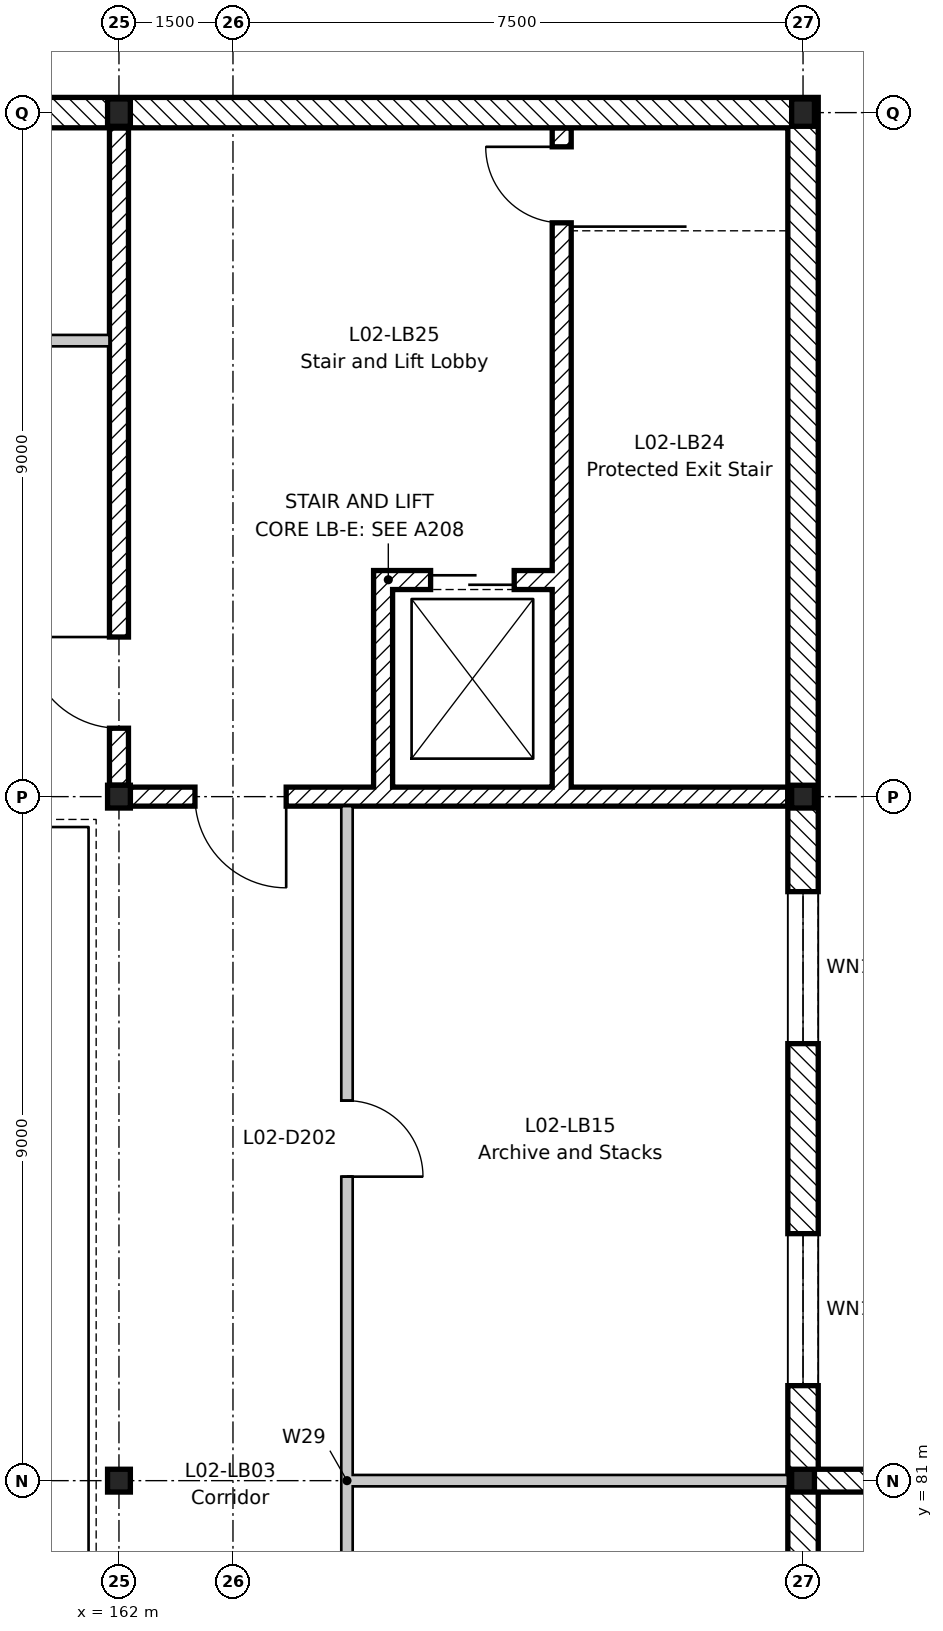
"""IFC4 building model, lengths in metres.
Left out: names, types, materials, properties, quantities, classifications, styles, units other than length and angle.
Written with IfcOpenShell. Run it as: python <this file> out.ifc"""

import sys

from ifc_helpers import new_model, si_unit, direction, frame, frame_2d, origin, origin_2d, place, context, subcontext, project, spatial, rectangle, i_section, extrude, element, fill, save


model = new_model("IFC4")
c1 = context("Model", 3, precision=1e-05, world=origin(), true_north=direction((0.0, 1.0)))
c2 = subcontext(c1, "Body", "Model", "MODEL_VIEW")
j1 = project(units=[si_unit("LENGTHUNIT", "METRE"), si_unit("PLANEANGLEUNIT", "RADIAN")], contexts=[c1])
p1 = place(None, origin())
s1 = spatial("IfcSite", under=j1, at=p1, CompositionType="ELEMENT")
p2 = place(p1, origin())
s2 = spatial("IfcBuilding", under=s1, at=p2, CompositionType="ELEMENT")
p3 = place(p2, frame((0.0, 0.0, 9.9)))
s3 = spatial("IfcBuildingStorey", under=s2, at=p3, CompositionType="ELEMENT", Elevation=9.9)
for number, where, z_axis, x_axis in (
    (1, (162.0, 81.0, -0.2), (0.0, 0.0, 1.0), (1.0, 0.0, 0.0)),
    (2, (162.0, 90.0, -0.2), (0.0, 0.0, 1.0), (1.0, 0.0, 0.0)),
):
    element("IfcColumn", number, at=place(p3, frame(where, z_axis=z_axis, x_axis=x_axis)), inside=s3, PredefinedType="COLUMN", context=c2, shape_type="SweptSolid", body=[
        extrude(i_section(OverallWidth=0.3, OverallDepth=0.3, WebThickness=0.011, FlangeThickness=0.019, FilletRadius=0.027, at=origin_2d()), origin(), (0.0, 0.0, 1.0), 4.45),
    ])
p4 = place(p3, frame((162.0, 99.0, -0.2), z_axis=(0.0, 0.0, 1.0), x_axis=(1.0, 0.0, 0.0)))
e3 = element("IfcColumn", 3, at=p4, inside=s3, PredefinedType="COLUMN", context=c2, shape_type="SweptSolid", body=[
    extrude(i_section(OverallWidth=0.3, OverallDepth=0.36, WebThickness=0.012, FlangeThickness=0.022, FilletRadius=0.027, at=origin_2d()), origin(), (0.0, 0.0, 1.0), 4.45),
])
for number, where, z_axis, x_axis in (
    (4, (171.0, 81.0, -0.2), (0.0, 0.0, 1.0), (1.0, 0.0, 0.0)),
    (5, (171.0, 90.0, -0.2), (0.0, 0.0, 1.0), (1.0, 0.0, 0.0)),
):
    element("IfcColumn", number, at=place(p3, frame(where, z_axis=z_axis, x_axis=x_axis)), inside=s3, PredefinedType="COLUMN", context=c2, shape_type="SweptSolid", body=[
        extrude(i_section(OverallWidth=0.3, OverallDepth=0.3, WebThickness=0.011, FlangeThickness=0.019, FilletRadius=0.027, at=origin_2d()), origin(), (0.0, 0.0, 1.0), 4.45),
    ])
p5 = place(p3, frame((171.0, 99.0, -0.2), z_axis=(0.0, 0.0, 1.0), x_axis=(1.0, 0.0, 0.0)))
e6 = element("IfcColumn", 6, at=p5, inside=s3, PredefinedType="COLUMN", context=c2, shape_type="SweptSolid", body=[
    extrude(i_section(OverallWidth=0.3, OverallDepth=0.36, WebThickness=0.012, FlangeThickness=0.022, FilletRadius=0.027, at=origin_2d()), origin(), (0.0, 0.0, 1.0), 4.45),
])
p6 = place(p3, frame((167.825, 98.8, 0.0), z_axis=(0.0, 0.0, 1.0), x_axis=(0.0, -1.0, 0.0)))
e7 = element("IfcWall", 7, at=p6, inside=s3, PredefinedType="SHEAR", context=c2, shape_type="SweptSolid", body=[
    extrude(rectangle(XDim=8.675, YDim=0.25, at=frame_2d((4.337, 0.0))), origin(), (0.0, 0.0, 1.0), 4.25),
])
p7 = place(p6, frame((0.25, 0.0, 0.0)))
e8 = element("IfcOpeningElement", 8, at=p7, cuts=e7, PredefinedType="OPENING", context=c2, shape_type="SweptSolid", body=[
    extrude(rectangle(XDim=1.0, YDim=2.1, at=frame_2d((0.5, 1.05))), frame((0.0, 0.135, 0.0), z_axis=(0.0, -1.0, 0.0), x_axis=(1.0, 0.0, 0.0)), (0.0, 0.0, 1.0), 0.27),
])
p8 = place(p3, frame((162.0, 98.8, 0.0), z_axis=(0.0, 0.0, 1.0), x_axis=(0.0, -1.0, 0.0)))
e9 = element("IfcWall", 9, at=p8, inside=s3, PredefinedType="SHEAR", context=c2, shape_type="SweptSolid", body=[
    extrude(rectangle(XDim=8.65, YDim=0.25, at=frame_2d((4.325, 0.0))), origin(), (0.0, 0.0, 1.0), 4.25),
])
p9 = place(p8, frame((6.7, 0.0, 0.0)))
e10 = element("IfcOpeningElement", 10, at=p9, cuts=e9, PredefinedType="OPENING", context=c2, shape_type="SweptSolid", body=[
    extrude(rectangle(XDim=1.2, YDim=2.1, at=frame_2d((0.6, 1.05))), frame((0.0, 0.135, 0.0), z_axis=(0.0, -1.0, 0.0), x_axis=(1.0, 0.0, 0.0)), (0.0, 0.0, 1.0), 0.27),
])
p10 = place(p3, frame((170.8, 90.0, 0.0), z_axis=(0.0, 0.0, 1.0), x_axis=(-1.0, 0.0, 0.0)))
e11 = element("IfcWall", 11, at=p10, inside=s3, PredefinedType="SHEAR", context=c2, shape_type="SweptSolid", body=[
    extrude(rectangle(XDim=8.65, YDim=0.25, at=frame_2d((4.325, 0.0))), origin(), (0.0, 0.0, 1.0), 4.25),
])
p11 = place(p10, frame((6.6, 0.0, 0.0)))
e12 = element("IfcOpeningElement", 12, at=p11, cuts=e11, PredefinedType="OPENING", context=c2, shape_type="SweptSolid", body=[
    extrude(rectangle(XDim=1.2, YDim=2.1, at=frame_2d((0.6, 1.05))), frame((0.0, 0.135, 0.0), z_axis=(0.0, -1.0, 0.0), x_axis=(1.0, 0.0, 0.0)), (0.0, 0.0, 1.0), 0.27),
])
p12 = place(p3, frame((167.7, 92.85, 0.0), z_axis=(0.0, 0.0, 1.0), x_axis=(-1.0, 0.0, 0.0)))
e13 = element("IfcWall", 13, at=p12, inside=s3, PredefinedType="SHEAR", context=c2, shape_type="SweptSolid", body=[
    extrude(rectangle(XDim=2.35, YDim=0.25, at=frame_2d((1.175, 0.0))), origin(), (0.0, 0.0, 1.0), 4.25),
])
p13 = place(p12, frame((0.5, 0.0, 0.0)))
e14 = element("IfcOpeningElement", 14, at=p13, cuts=e13, PredefinedType="OPENING", context=c2, shape_type="SweptSolid", body=[
    extrude(rectangle(XDim=1.1, YDim=2.1, at=frame_2d((0.55, 1.05))), frame((0.0, 0.135, 0.0), z_axis=(0.0, -1.0, 0.0), x_axis=(1.0, 0.0, 0.0)), (0.0, 0.0, 1.0), 0.27),
])
p14 = place(p3, frame((165.475, 92.725, 0.0), z_axis=(0.0, 0.0, 1.0), x_axis=(0.0, -1.0, 0.0)))
e15 = element("IfcWall", 15, at=p14, inside=s3, PredefinedType="SHEAR", context=c2, shape_type="SweptSolid", body=[
    extrude(rectangle(XDim=2.6, YDim=0.25, at=frame_2d((1.3, 0.0))), origin(), (0.0, 0.0, 1.0), 4.25),
])
p15 = place(p3, frame((171.15, 81.0, 0.0), z_axis=(0.0, 0.0, 1.0), x_axis=(1.0, 0.0, 0.0)))
e16 = element("IfcWall", 16, at=p15, inside=s3, PredefinedType="STANDARD", context=c2, shape_type="SweptSolid", body=[
    extrude(rectangle(XDim=2.85, YDim=0.3, at=frame_2d((1.425, 0.0))), origin(), (0.0, 0.0, 1.0), 3.97),
])
p16 = place(p3, frame((116.8, 99.0, 0.0), z_axis=(0.0, 0.0, 1.0), x_axis=(1.0, 0.0, 0.0)))
e17 = element("IfcWall", 17, at=p16, inside=s3, PredefinedType="STANDARD", context=c2, shape_type="SweptSolid", body=[
    extrude(rectangle(XDim=54.4, YDim=0.4, at=frame_2d((27.2, 0.0))), origin(), (0.0, 0.0, 1.0), 4.25),
])
p17 = place(p16, frame((1.45, 0.0, 0.5)))
e18 = element("IfcOpeningElement", 18, at=p17, cuts=e17, PredefinedType="OPENING", context=c2, shape_type="SweptSolid", body=[
    extrude(rectangle(XDim=2.0, YDim=3.2, at=frame_2d((1.0, 1.6))), frame((0.0, 0.21, 0.0), z_axis=(0.0, -1.0, 0.0), x_axis=(1.0, 0.0, 0.0)), (0.0, 0.0, 1.0), 0.42),
])
p18 = place(p16, frame((5.95, 0.0, 0.5)))
e19 = element("IfcOpeningElement", 19, at=p18, cuts=e17, PredefinedType="OPENING", context=c2, shape_type="SweptSolid", body=[
    extrude(rectangle(XDim=2.0, YDim=3.2, at=frame_2d((1.0, 1.6))), frame((0.0, 0.21, 0.0), z_axis=(0.0, -1.0, 0.0), x_axis=(1.0, 0.0, 0.0)), (0.0, 0.0, 1.0), 0.42),
])
p19 = place(p16, frame((10.45, 0.0, 0.5)))
e20 = element("IfcOpeningElement", 20, at=p19, cuts=e17, PredefinedType="OPENING", context=c2, shape_type="SweptSolid", body=[
    extrude(rectangle(XDim=2.0, YDim=3.2, at=frame_2d((1.0, 1.6))), frame((0.0, 0.21, 0.0), z_axis=(0.0, -1.0, 0.0), x_axis=(1.0, 0.0, 0.0)), (0.0, 0.0, 1.0), 0.42),
])
p20 = place(p16, frame((14.95, 0.0, 0.5)))
e21 = element("IfcOpeningElement", 21, at=p20, cuts=e17, PredefinedType="OPENING", context=c2, shape_type="SweptSolid", body=[
    extrude(rectangle(XDim=2.0, YDim=3.2, at=frame_2d((1.0, 1.6))), frame((0.0, 0.21, 0.0), z_axis=(0.0, -1.0, 0.0), x_axis=(1.0, 0.0, 0.0)), (0.0, 0.0, 1.0), 0.42),
])
p21 = place(p16, frame((28.45, 0.0, 0.5)))
e22 = element("IfcOpeningElement", 22, at=p21, cuts=e17, PredefinedType="OPENING", context=c2, shape_type="SweptSolid", body=[
    extrude(rectangle(XDim=2.0, YDim=3.2, at=frame_2d((1.0, 1.6))), frame((0.0, 0.21, 0.0), z_axis=(0.0, -1.0, 0.0), x_axis=(1.0, 0.0, 0.0)), (0.0, 0.0, 1.0), 0.42),
])
p22 = place(p16, frame((32.95, 0.0, 0.5)))
e23 = element("IfcOpeningElement", 23, at=p22, cuts=e17, PredefinedType="OPENING", context=c2, shape_type="SweptSolid", body=[
    extrude(rectangle(XDim=2.0, YDim=3.2, at=frame_2d((1.0, 1.6))), frame((0.0, 0.21, 0.0), z_axis=(0.0, -1.0, 0.0), x_axis=(1.0, 0.0, 0.0)), (0.0, 0.0, 1.0), 0.42),
])
p23 = place(p16, frame((37.45, 0.0, 0.5)))
e24 = element("IfcOpeningElement", 24, at=p23, cuts=e17, PredefinedType="OPENING", context=c2, shape_type="SweptSolid", body=[
    extrude(rectangle(XDim=2.0, YDim=3.2, at=frame_2d((1.0, 1.6))), frame((0.0, 0.21, 0.0), z_axis=(0.0, -1.0, 0.0), x_axis=(1.0, 0.0, 0.0)), (0.0, 0.0, 1.0), 0.42),
])
p24 = place(p16, frame((41.95, 0.0, 0.5)))
e25 = element("IfcOpeningElement", 25, at=p24, cuts=e17, PredefinedType="OPENING", context=c2, shape_type="SweptSolid", body=[
    extrude(rectangle(XDim=2.0, YDim=3.2, at=frame_2d((1.0, 1.6))), frame((0.0, 0.21, 0.0), z_axis=(0.0, -1.0, 0.0), x_axis=(1.0, 0.0, 0.0)), (0.0, 0.0, 1.0), 0.42),
])
p25 = place(p16, frame((19.55, 0.0, 0.0)))
e26 = element("IfcOpeningElement", 26, at=p25, cuts=e17, PredefinedType="OPENING", context=c2, shape_type="SweptSolid", body=[
    extrude(rectangle(XDim=1.8, YDim=2.4, at=frame_2d((0.9, 1.2))), frame((0.0, 0.21, 0.0), z_axis=(0.0, -1.0, 0.0), x_axis=(1.0, 0.0, 0.0)), (0.0, 0.0, 1.0), 0.42),
])
p26 = place(p16, frame((24.05, 0.0, 0.0)))
e27 = element("IfcOpeningElement", 27, at=p26, cuts=e17, PredefinedType="OPENING", context=c2, shape_type="SweptSolid", body=[
    extrude(rectangle(XDim=1.8, YDim=2.4, at=frame_2d((0.9, 1.2))), frame((0.0, 0.21, 0.0), z_axis=(0.0, -1.0, 0.0), x_axis=(1.0, 0.0, 0.0)), (0.0, 0.0, 1.0), 0.42),
])
p27 = place(p3, frame((171.0, 63.2, 0.0), z_axis=(0.0, 0.0, 1.0), x_axis=(0.0, 1.0, 0.0)))
e28 = element("IfcWall", 28, at=p27, inside=s3, PredefinedType="STANDARD", context=c2, shape_type="SweptSolid", body=[
    extrude(rectangle(XDim=35.6, YDim=0.4, at=frame_2d((17.8, 0.0))), origin(), (0.0, 0.0, 1.0), 4.25),
])
p28 = place(p27, frame((1.05, 0.0, 0.5)))
e29 = element("IfcOpeningElement", 29, at=p28, cuts=e28, PredefinedType="OPENING", context=c2, shape_type="SweptSolid", body=[
    extrude(rectangle(XDim=2.0, YDim=3.2, at=frame_2d((1.0, 1.6))), frame((0.0, 0.21, 0.0), z_axis=(0.0, -1.0, 0.0), x_axis=(1.0, 0.0, 0.0)), (0.0, 0.0, 1.0), 0.42),
])
p29 = place(p27, frame((5.55, 0.0, 0.5)))
e30 = element("IfcOpeningElement", 30, at=p29, cuts=e28, PredefinedType="OPENING", context=c2, shape_type="SweptSolid", body=[
    extrude(rectangle(XDim=2.0, YDim=3.2, at=frame_2d((1.0, 1.6))), frame((0.0, 0.21, 0.0), z_axis=(0.0, -1.0, 0.0), x_axis=(1.0, 0.0, 0.0)), (0.0, 0.0, 1.0), 0.42),
])
p30 = place(p27, frame((19.05, 0.0, 0.5)))
e31 = element("IfcOpeningElement", 31, at=p30, cuts=e28, PredefinedType="OPENING", context=c2, shape_type="SweptSolid", body=[
    extrude(rectangle(XDim=2.0, YDim=3.2, at=frame_2d((1.0, 1.6))), frame((0.0, 0.21, 0.0), z_axis=(0.0, -1.0, 0.0), x_axis=(1.0, 0.0, 0.0)), (0.0, 0.0, 1.0), 0.42),
])
p31 = place(p27, frame((23.55, 0.0, 0.5)))
e32 = element("IfcOpeningElement", 32, at=p31, cuts=e28, PredefinedType="OPENING", context=c2, shape_type="SweptSolid", body=[
    extrude(rectangle(XDim=2.0, YDim=3.2, at=frame_2d((1.0, 1.6))), frame((0.0, 0.21, 0.0), z_axis=(0.0, -1.0, 0.0), x_axis=(1.0, 0.0, 0.0)), (0.0, 0.0, 1.0), 0.42),
])
p32 = place(p27, frame((10.15, 0.0, 0.0)))
e33 = element("IfcOpeningElement", 33, at=p32, cuts=e28, PredefinedType="OPENING", context=c2, shape_type="SweptSolid", body=[
    extrude(rectangle(XDim=1.8, YDim=2.4, at=frame_2d((0.9, 1.2))), frame((0.0, 0.21, 0.0), z_axis=(0.0, -1.0, 0.0), x_axis=(1.0, 0.0, 0.0)), (0.0, 0.0, 1.0), 0.42),
])
p33 = place(p27, frame((14.65, 0.0, 0.0)))
e34 = element("IfcOpeningElement", 34, at=p33, cuts=e28, PredefinedType="OPENING", context=c2, shape_type="SweptSolid", body=[
    extrude(rectangle(XDim=1.8, YDim=2.4, at=frame_2d((0.9, 1.2))), frame((0.0, 0.21, 0.0), z_axis=(0.0, -1.0, 0.0), x_axis=(1.0, 0.0, 0.0)), (0.0, 0.0, 1.0), 0.42),
])
p34 = place(p3, frame((165.075, 81.0, 0.0), z_axis=(0.0, 0.0, 1.0), x_axis=(1.0, 0.0, 0.0)))
e35 = element("IfcWall", 35, at=p34, inside=s3, PredefinedType="PARTITIONING", context=c2, shape_type="SweptSolid", body=[
    extrude(rectangle(XDim=5.725, YDim=0.15, at=frame_2d((2.863, 0.0))), origin(), (0.0, 0.0, 1.0), 4.25),
])
p35 = place(p3, frame((147.0, 96.0, 0.0), z_axis=(0.0, 0.0, 1.0), x_axis=(1.0, 0.0, 0.0)))
e36 = element("IfcWall", 36, at=p35, inside=s3, PredefinedType="PARTITIONING", context=c2, shape_type="SweptSolid", body=[
    extrude(rectangle(XDim=14.875, YDim=0.15, at=frame_2d((7.438, 0.0))), origin(), (0.0, 0.0, 1.0), 4.25),
])
p36 = place(p35, frame((7.0, 0.0, 0.0)))
e37 = element("IfcOpeningElement", 37, at=p36, cuts=e36, PredefinedType="OPENING", context=c2, shape_type="SweptSolid", body=[
    extrude(rectangle(XDim=1.0, YDim=2.1, at=frame_2d((0.5, 1.05))), frame((0.0, 0.085, 0.0), z_axis=(0.0, -1.0, 0.0), x_axis=(1.0, 0.0, 0.0)), (0.0, 0.0, 1.0), 0.17),
])
p37 = place(p3, frame((165.0, 69.075, 0.0), z_axis=(0.0, 0.0, 1.0), x_axis=(0.0, 1.0, 0.0)))
e38 = element("IfcWall", 38, at=p37, inside=s3, PredefinedType="PARTITIONING", context=c2, shape_type="SweptSolid", body=[
    extrude(rectangle(XDim=20.8, YDim=0.15, at=frame_2d((10.4, 0.0))), origin(), (0.0, 0.0, 1.0), 4.25),
])
p38 = place(p37, frame((0.825, 0.0, 0.0)))
e39 = element("IfcOpeningElement", 39, at=p38, cuts=e38, PredefinedType="OPENING", context=c2, shape_type="SweptSolid", body=[
    extrude(rectangle(XDim=1.2, YDim=2.1, at=frame_2d((0.6, 1.05))), frame((0.0, 0.085, 0.0), z_axis=(0.0, -1.0, 0.0), x_axis=(1.0, 0.0, 0.0)), (0.0, 0.0, 1.0), 0.17),
])
p39 = place(p37, frame((6.925, 0.0, 0.0)))
e40 = element("IfcOpeningElement", 40, at=p39, cuts=e38, PredefinedType="OPENING", context=c2, shape_type="SweptSolid", body=[
    extrude(rectangle(XDim=1.0, YDim=2.1, at=frame_2d((0.5, 1.05))), frame((0.0, 0.085, 0.0), z_axis=(0.0, -1.0, 0.0), x_axis=(1.0, 0.0, 0.0)), (0.0, 0.0, 1.0), 0.17),
])
p40 = place(p37, frame((15.925, 0.0, 0.0)))
e41 = element("IfcOpeningElement", 41, at=p40, cuts=e38, PredefinedType="OPENING", context=c2, shape_type="SweptSolid", body=[
    extrude(rectangle(XDim=1.0, YDim=2.1, at=frame_2d((0.5, 1.05))), frame((0.0, 0.085, 0.0), z_axis=(0.0, -1.0, 0.0), x_axis=(1.0, 0.0, 0.0)), (0.0, 0.0, 1.0), 0.17),
])
p41 = place(p30, origin())
e42 = element("IfcWindow", 42, at=p41, inside=s3, PartitioningType="SINGLE_PANEL", PredefinedType="WINDOW", context=c2, shape_type="SweptSolid", body=[
    extrude(rectangle(XDim=2.0, YDim=3.2, at=frame_2d((1.0, 1.6))), frame((0.0, 0.03, 0.0), z_axis=(0.0, -1.0, 0.0), x_axis=(1.0, 0.0, 0.0)), (0.0, 0.0, 1.0), 0.06),
])
fill(e31, e42)
p42 = place(p31, origin())
e43 = element("IfcWindow", 43, at=p42, inside=s3, PartitioningType="SINGLE_PANEL", PredefinedType="WINDOW", context=c2, shape_type="SweptSolid", body=[
    extrude(rectangle(XDim=2.0, YDim=3.2, at=frame_2d((1.0, 1.6))), frame((0.0, 0.03, 0.0), z_axis=(0.0, -1.0, 0.0), x_axis=(1.0, 0.0, 0.0)), (0.0, 0.0, 1.0), 0.06),
])
fill(e32, e43)
p43 = place(p40, frame((1.0, 0.0, 0.0), z_axis=(0.0, 0.0, 1.0), x_axis=(-1.0, 0.0, 0.0)))
e44 = element("IfcDoor", 44, at=p43, inside=s3, OperationType="SINGLE_SWING_RIGHT", PredefinedType="DOOR", context=c2, shape_type="SweptSolid", body=[
    extrude(rectangle(XDim=1.0, YDim=2.1, at=frame_2d((0.5, 1.05))), frame((0.0, 0.025, 0.0), z_axis=(0.0, -1.0, 0.0), x_axis=(1.0, 0.0, 0.0)), (0.0, 0.0, 1.0), 0.05),
])
fill(e41, e44)
p44 = place(p7, frame((1.0, 0.0, 0.0), z_axis=(0.0, 0.0, 1.0), x_axis=(-1.0, 0.0, 0.0)))
e45 = element("IfcDoor", 45, at=p44, inside=s3, OperationType="SINGLE_SWING_RIGHT", PredefinedType="DOOR", context=c2, shape_type="SweptSolid", body=[
    extrude(rectangle(XDim=1.0, YDim=2.1, at=frame_2d((0.5, 1.05))), frame((0.0, 0.025, 0.0), z_axis=(0.0, -1.0, 0.0), x_axis=(1.0, 0.0, 0.0)), (0.0, 0.0, 1.0), 0.05),
])
fill(e8, e45)
p45 = place(p13, origin())
e46 = element("IfcDoor", 46, at=p45, inside=s3, OperationType="SLIDING_TO_LEFT", PredefinedType="DOOR", context=c2, shape_type="SweptSolid", body=[
    extrude(rectangle(XDim=1.1, YDim=2.1, at=frame_2d((0.55, 1.05))), frame((0.0, 0.025, 0.0), z_axis=(0.0, -1.0, 0.0), x_axis=(1.0, 0.0, 0.0)), (0.0, 0.0, 1.0), 0.05),
])
fill(e14, e46)
p46 = place(p11, origin())
e47 = element("IfcDoor", 47, at=p46, inside=s3, OperationType="SINGLE_SWING_LEFT", PredefinedType="DOOR", context=c2, shape_type="SweptSolid", body=[
    extrude(rectangle(XDim=1.2, YDim=2.1, at=frame_2d((0.6, 1.05))), frame((0.0, 0.025, 0.0), z_axis=(0.0, -1.0, 0.0), x_axis=(1.0, 0.0, 0.0)), (0.0, 0.0, 1.0), 0.05),
])
fill(e12, e47)
p47 = place(p9, frame((1.2, 0.0, 0.0), z_axis=(0.0, 0.0, 1.0), x_axis=(-1.0, 0.0, 0.0)))
e48 = element("IfcDoor", 48, at=p47, inside=s3, OperationType="SINGLE_SWING_RIGHT", PredefinedType="DOOR", context=c2, shape_type="SweptSolid", body=[
    extrude(rectangle(XDim=1.2, YDim=2.1, at=frame_2d((0.6, 1.05))), frame((0.0, 0.025, 0.0), z_axis=(0.0, -1.0, 0.0), x_axis=(1.0, 0.0, 0.0)), (0.0, 0.0, 1.0), 0.05),
])
fill(e10, e48)
save(model, sys.argv[1])
